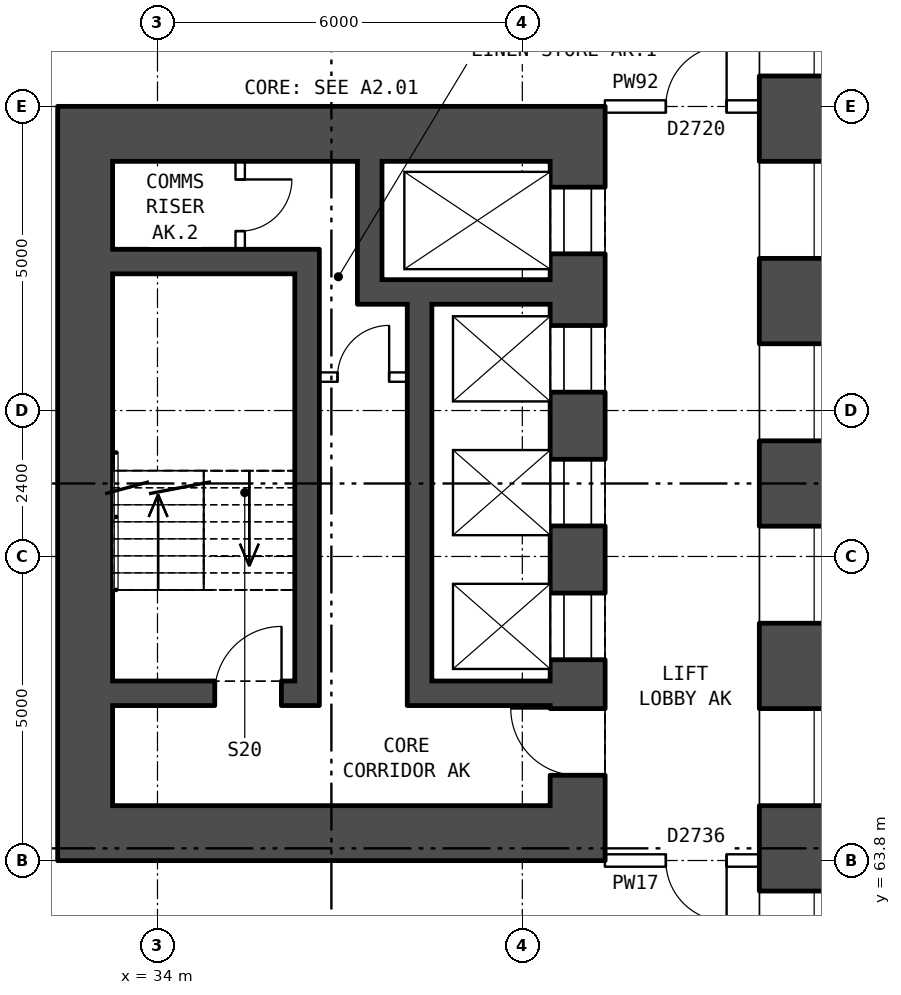
"""IFC4 building model, lengths in metres.
Left out: names, types, materials, properties, quantities, classifications, styles, units other than length and angle.
Written with IfcOpenShell. Run it as: python <this file> out.ifc"""

import sys

from ifc_helpers import new_model, si_unit, direction, frame, frame_2d, origin, place, context, subcontext, project, spatial, rectangle, extrude, element, fill, save


model = new_model("IFC4")
c1 = context("Model", 3, precision=1e-05, world=origin(), true_north=direction((0.0, 1.0)))
c2 = subcontext(c1, "Body", "Model", "MODEL_VIEW")
j1 = project(units=[si_unit("LENGTHUNIT", "METRE"), si_unit("PLANEANGLEUNIT", "RADIAN")], contexts=[c1])
p1 = place(None, origin())
s1 = spatial("IfcSite", under=j1, at=p1, CompositionType="ELEMENT")
p2 = place(p1, origin())
s2 = spatial("IfcBuilding", under=s1, at=p2, CompositionType="ELEMENT")
p3 = place(p2, origin())
s3 = spatial("IfcBuildingStorey", under=s2, at=p3, CompositionType="ELEMENT", Elevation=0.0)
p4 = place(p3, frame((44.5, 56.4, -0.35), z_axis=(0.0, 0.0, 1.0), x_axis=(0.0, 1.0, 0.0)))
e1 = element("IfcWall", 1, at=p4, inside=s3, PredefinedType="SHEAR", context=c2, shape_type="SweptSolid", body=[
    extrude(rectangle(XDim=27.2, YDim=1.2, at=frame_2d((13.6, 0.0))), origin(), (0.0, 0.0, 1.0), 5.55),
])
p5 = place(p4, frame((2.3, 0.0, 0.8)))
e2 = element("IfcOpeningElement", 2, at=p5, cuts=e1, PredefinedType="OPENING", context=c2, shape_type="SweptSolid", body=[
    extrude(rectangle(XDim=1.6, YDim=1.8, at=frame_2d((0.8, 0.9))), frame((0.0, 0.61, 0.0), z_axis=(0.0, -1.0, 0.0), x_axis=(1.0, 0.0, 0.0)), (0.0, 0.0, 1.0), 1.22),
])
p6 = place(p4, frame((5.3, 0.0, 0.8)))
e3 = element("IfcOpeningElement", 3, at=p6, cuts=e1, PredefinedType="OPENING", context=c2, shape_type="SweptSolid", body=[
    extrude(rectangle(XDim=1.6, YDim=1.8, at=frame_2d((0.8, 0.9))), frame((0.0, 0.61, 0.0), z_axis=(0.0, -1.0, 0.0), x_axis=(1.0, 0.0, 0.0)), (0.0, 0.0, 1.0), 1.22),
])
p7 = place(p4, frame((8.3, 0.0, 0.8)))
e4 = element("IfcOpeningElement", 4, at=p7, cuts=e1, PredefinedType="OPENING", context=c2, shape_type="SweptSolid", body=[
    extrude(rectangle(XDim=1.6, YDim=1.8, at=frame_2d((0.8, 0.9))), frame((0.0, 0.61, 0.0), z_axis=(0.0, -1.0, 0.0), x_axis=(1.0, 0.0, 0.0)), (0.0, 0.0, 1.0), 1.22),
])
p8 = place(p4, frame((11.3, 0.0, 0.8)))
e5 = element("IfcOpeningElement", 5, at=p8, cuts=e1, PredefinedType="OPENING", context=c2, shape_type="SweptSolid", body=[
    extrude(rectangle(XDim=1.6, YDim=1.8, at=frame_2d((0.8, 0.9))), frame((0.0, 0.61, 0.0), z_axis=(0.0, -1.0, 0.0), x_axis=(1.0, 0.0, 0.0)), (0.0, 0.0, 1.0), 1.22),
])
p9 = place(p4, frame((14.3, 0.0, 0.8)))
e6 = element("IfcOpeningElement", 6, at=p9, cuts=e1, PredefinedType="OPENING", context=c2, shape_type="SweptSolid", body=[
    extrude(rectangle(XDim=1.6, YDim=1.8, at=frame_2d((0.8, 0.9))), frame((0.0, 0.61, 0.0), z_axis=(0.0, -1.0, 0.0), x_axis=(1.0, 0.0, 0.0)), (0.0, 0.0, 1.0), 1.22),
])
p10 = place(p4, frame((17.3, 0.0, 0.8)))
e7 = element("IfcOpeningElement", 7, at=p10, cuts=e1, PredefinedType="OPENING", context=c2, shape_type="SweptSolid", body=[
    extrude(rectangle(XDim=1.6, YDim=1.8, at=frame_2d((0.8, 0.9))), frame((0.0, 0.61, 0.0), z_axis=(0.0, -1.0, 0.0), x_axis=(1.0, 0.0, 0.0)), (0.0, 0.0, 1.0), 1.22),
])
p11 = place(p4, frame((20.3, 0.0, 0.8)))
e8 = element("IfcOpeningElement", 8, at=p11, cuts=e1, PredefinedType="OPENING", context=c2, shape_type="SweptSolid", body=[
    extrude(rectangle(XDim=1.6, YDim=1.8, at=frame_2d((0.8, 0.9))), frame((0.0, 0.61, 0.0), z_axis=(0.0, -1.0, 0.0), x_axis=(1.0, 0.0, 0.0)), (0.0, 0.0, 1.0), 1.22),
])
p12 = place(p4, frame((23.3, 0.0, 0.8)))
e9 = element("IfcOpeningElement", 9, at=p12, cuts=e1, PredefinedType="OPENING", context=c2, shape_type="SweptSolid", body=[
    extrude(rectangle(XDim=1.6, YDim=1.8, at=frame_2d((0.8, 0.9))), frame((0.0, 0.61, 0.0), z_axis=(0.0, -1.0, 0.0), x_axis=(1.0, 0.0, 0.0)), (0.0, 0.0, 1.0), 1.22),
])
p13 = place(p3, frame((40.91, 75.3, 0.0), z_axis=(0.0, 0.0, 1.0), x_axis=(0.0, -1.0, 0.0)))
e10 = element("IfcWall", 10, at=p13, inside=s3, PredefinedType="SHEAR", context=c2, shape_type="SweptSolid", body=[
    extrude(rectangle(XDim=10.6, YDim=0.9, at=frame_2d((5.3, 0.0))), origin(), (0.0, 0.0, 1.0), 5.2),
])
p14 = place(p13, frame((0.425, 0.0, 0.0)))
e11 = element("IfcOpeningElement", 11, at=p14, cuts=e10, PredefinedType="OPENING", context=c2, shape_type="SweptSolid", body=[
    extrude(rectangle(XDim=1.1, YDim=2.1, at=frame_2d((0.55, 1.05))), frame((0.0, 0.46, 0.0), z_axis=(0.0, -1.0, 0.0), x_axis=(1.0, 0.0, 0.0)), (0.0, 0.0, 1.0), 0.92),
])
p15 = place(p13, frame((2.7, 0.0, 0.0)))
e12 = element("IfcOpeningElement", 12, at=p15, cuts=e10, PredefinedType="OPENING", context=c2, shape_type="SweptSolid", body=[
    extrude(rectangle(XDim=1.1, YDim=2.1, at=frame_2d((0.55, 1.05))), frame((0.0, 0.46, 0.0), z_axis=(0.0, -1.0, 0.0), x_axis=(1.0, 0.0, 0.0)), (0.0, 0.0, 1.0), 0.92),
])
p16 = place(p13, frame((4.9, 0.0, 0.0)))
e13 = element("IfcOpeningElement", 13, at=p16, cuts=e10, PredefinedType="OPENING", context=c2, shape_type="SweptSolid", body=[
    extrude(rectangle(XDim=1.1, YDim=2.1, at=frame_2d((0.55, 1.05))), frame((0.0, 0.46, 0.0), z_axis=(0.0, -1.0, 0.0), x_axis=(1.0, 0.0, 0.0)), (0.0, 0.0, 1.0), 0.92),
])
p17 = place(p13, frame((7.1, 0.0, 0.0)))
e14 = element("IfcOpeningElement", 14, at=p17, cuts=e10, PredefinedType="OPENING", context=c2, shape_type="SweptSolid", body=[
    extrude(rectangle(XDim=1.1, YDim=2.1, at=frame_2d((0.55, 1.05))), frame((0.0, 0.46, 0.0), z_axis=(0.0, -1.0, 0.0), x_axis=(1.0, 0.0, 0.0)), (0.0, 0.0, 1.0), 0.92),
])
p18 = place(p13, frame((9.0, 0.0, 0.0)))
e15 = element("IfcOpeningElement", 15, at=p18, cuts=e10, PredefinedType="OPENING", context=c2, shape_type="SweptSolid", body=[
    extrude(rectangle(XDim=1.1, YDim=2.1, at=frame_2d((0.55, 1.05))), frame((0.0, 0.46, 0.0), z_axis=(0.0, -1.0, 0.0), x_axis=(1.0, 0.0, 0.0)), (0.0, 0.0, 1.0), 0.92),
])
p19 = place(p3, frame((32.81, 75.3, 0.0), z_axis=(0.0, 0.0, 1.0), x_axis=(0.0, -1.0, 0.0)))
e16 = element("IfcWall", 16, at=p19, inside=s3, PredefinedType="SHEAR", context=c2, shape_type="SweptSolid", body=[
    extrude(rectangle(XDim=10.6, YDim=0.9, at=frame_2d((5.3, 0.0))), origin(), (0.0, 0.0, 1.0), 5.2),
])
for number, where, z_axis, x_axis in (
    (17, (41.36, 75.75, 0.0), (0.0, 0.0, 1.0), (-1.0, 0.0, 0.0)),
    (18, (41.36, 64.25, 0.0), (0.0, 0.0, 1.0), (-1.0, 0.0, 0.0)),
):
    element("IfcWall", number, at=place(p3, frame(where, z_axis=z_axis, x_axis=x_axis)), inside=s3, PredefinedType="SHEAR", context=c2, shape_type="SweptSolid", body=[
        extrude(rectangle(XDim=9.0, YDim=0.9, at=frame_2d((4.5, 0.0))), origin(), (0.0, 0.0, 1.0), 5.2),
    ])
p20 = place(p3, frame((36.26, 73.65, 0.0), z_axis=(0.0, 0.0, 1.0), x_axis=(-1.0, 0.0, 0.0)))
e19 = element("IfcWall", 19, at=p20, inside=s3, PredefinedType="SHEAR", context=c2, shape_type="SweptSolid", body=[
    extrude(rectangle(XDim=3.0, YDim=0.4, at=frame_2d((1.5, 0.0))), origin(), (0.0, 0.0, 1.0), 5.2),
])
p21 = place(p3, frame((40.46, 73.15, 0.0), z_axis=(0.0, 0.0, 1.0), x_axis=(-1.0, 0.0, 0.0)))
e20 = element("IfcWall", 20, at=p21, inside=s3, PredefinedType="SHEAR", context=c2, shape_type="SweptSolid", body=[
    extrude(rectangle(XDim=3.17, YDim=0.4, at=frame_2d((1.585, 0.0))), origin(), (0.0, 0.0, 1.0), 5.2),
])
p22 = place(p3, frame((38.11, 71.75, 0.0), z_axis=(0.0, 0.0, 1.0), x_axis=(-1.0, 0.0, 0.0)))
e21 = element("IfcWall", 21, at=p22, inside=s3, PredefinedType="PARTITIONING", context=c2, shape_type="SweptSolid", body=[
    extrude(rectangle(XDim=1.45, YDim=0.15, at=frame_2d((0.725, 0.0))), origin(), (0.0, 0.0, 1.0), 5.2),
])
p23 = place(p22, frame((0.3, 0.0, 0.0)))
e22 = element("IfcOpeningElement", 22, at=p23, cuts=e21, PredefinedType="OPENING", context=c2, shape_type="SweptSolid", body=[
    extrude(rectangle(XDim=0.85, YDim=2.1, at=frame_2d((0.425, 1.05))), frame((0.0, 0.085, 0.0), z_axis=(0.0, -1.0, 0.0), x_axis=(1.0, 0.0, 0.0)), (0.0, 0.0, 1.0), 0.17),
])
p24 = place(p3, frame((40.46, 66.55, 0.0), z_axis=(0.0, 0.0, 1.0), x_axis=(-1.0, 0.0, 0.0)))
e23 = element("IfcWall", 23, at=p24, inside=s3, PredefinedType="SHEAR", context=c2, shape_type="SweptSolid", body=[
    extrude(rectangle(XDim=1.95, YDim=0.4, at=frame_2d((0.975, 0.0))), origin(), (0.0, 0.0, 1.0), 5.2),
])
p25 = place(p3, frame((36.26, 66.55, 0.0), z_axis=(0.0, 0.0, 1.0), x_axis=(-1.0, 0.0, 0.0)))
e24 = element("IfcWall", 24, at=p25, inside=s3, PredefinedType="SHEAR", context=c2, shape_type="SweptSolid", body=[
    extrude(rectangle(XDim=3.0, YDim=0.4, at=frame_2d((1.5, 0.0))), origin(), (0.0, 0.0, 1.0), 5.2),
])
p26 = place(p25, frame((0.22, 0.0, 0.0)))
e25 = element("IfcOpeningElement", 25, at=p26, cuts=e24, PredefinedType="OPENING", context=c2, shape_type="SweptSolid", body=[
    extrude(rectangle(XDim=1.1, YDim=2.1, at=frame_2d((0.55, 1.05))), frame((0.0, 0.21, 0.0), z_axis=(0.0, -1.0, 0.0), x_axis=(1.0, 0.0, 0.0)), (0.0, 0.0, 1.0), 0.42),
])
p27 = place(p3, frame((38.31, 72.95, 0.0), z_axis=(0.0, 0.0, 1.0), x_axis=(0.0, -1.0, 0.0)))
e26 = element("IfcWall", 26, at=p27, inside=s3, PredefinedType="SHEAR", context=c2, shape_type="SweptSolid", body=[
    extrude(rectangle(XDim=6.6, YDim=0.4, at=frame_2d((3.3, 0.0))), origin(), (0.0, 0.0, 1.0), 5.2),
])
p28 = place(p3, frame((37.49, 75.3, 0.0), z_axis=(0.0, 0.0, 1.0), x_axis=(0.0, -1.0, 0.0)))
e27 = element("IfcWall", 27, at=p28, inside=s3, PredefinedType="SHEAR", context=c2, shape_type="SweptSolid", body=[
    extrude(rectangle(XDim=1.95, YDim=0.4, at=frame_2d((0.975, 0.0))), origin(), (0.0, 0.0, 1.0), 5.2),
])
p29 = place(p3, frame((36.46, 73.85, 0.0), z_axis=(0.0, 0.0, 1.0), x_axis=(0.0, -1.0, 0.0)))
e28 = element("IfcWall", 28, at=p29, inside=s3, PredefinedType="SHEAR", context=c2, shape_type="SweptSolid", body=[
    extrude(rectangle(XDim=7.5, YDim=0.4, at=frame_2d((3.75, 0.0))), origin(), (0.0, 0.0, 1.0), 5.2),
])
p30 = place(p3, frame((35.36, 75.3, 0.0), z_axis=(0.0, 0.0, 1.0), x_axis=(0.0, -1.0, 0.0)))
e29 = element("IfcWall", 29, at=p30, inside=s3, PredefinedType="PARTITIONING", context=c2, shape_type="SweptSolid", body=[
    extrude(rectangle(XDim=1.45, YDim=0.15, at=frame_2d((0.725, 0.0))), origin(), (0.0, 0.0, 1.0), 5.2),
])
p31 = place(p30, frame((0.3, 0.0, 0.0)))
e30 = element("IfcOpeningElement", 30, at=p31, cuts=e29, PredefinedType="OPENING", context=c2, shape_type="SweptSolid", body=[
    extrude(rectangle(XDim=0.85, YDim=2.1, at=frame_2d((0.425, 1.05))), frame((0.0, 0.085, 0.0), z_axis=(0.0, -1.0, 0.0), x_axis=(1.0, 0.0, 0.0)), (0.0, 0.0, 1.0), 0.17),
])
p32 = place(p3, frame((41.36, 63.8, 0.0), z_axis=(0.0, 0.0, 1.0), x_axis=(1.0, 0.0, 0.0)))
e31 = element("IfcWall", 31, at=p32, inside=s3, PredefinedType="PARTITIONING", context=c2, shape_type="SweptSolid", body=[
    extrude(rectangle(XDim=2.54, YDim=0.2, at=frame_2d((1.27, 0.0))), origin(), (0.0, 0.0, 1.0), 5.2),
])
p33 = place(p32, frame((1.0, 0.0, 0.0)))
e32 = element("IfcOpeningElement", 32, at=p33, cuts=e31, PredefinedType="OPENING", context=c2, shape_type="SweptSolid", body=[
    extrude(rectangle(XDim=1.0, YDim=2.1, at=frame_2d((0.5, 1.05))), frame((0.0, 0.11, 0.0), z_axis=(0.0, -1.0, 0.0), x_axis=(1.0, 0.0, 0.0)), (0.0, 0.0, 1.0), 0.22),
])
p34 = place(p3, frame((41.36, 76.2, 0.0), z_axis=(0.0, 0.0, 1.0), x_axis=(1.0, 0.0, 0.0)))
e33 = element("IfcWall", 33, at=p34, inside=s3, PredefinedType="PARTITIONING", context=c2, shape_type="SweptSolid", body=[
    extrude(rectangle(XDim=2.54, YDim=0.2, at=frame_2d((1.27, 0.0))), origin(), (0.0, 0.0, 1.0), 5.2),
])
p35 = place(p34, frame((1.0, 0.0, 0.0)))
e34 = element("IfcOpeningElement", 34, at=p35, cuts=e33, PredefinedType="OPENING", context=c2, shape_type="SweptSolid", body=[
    extrude(rectangle(XDim=1.0, YDim=2.1, at=frame_2d((0.5, 1.05))), frame((0.0, 0.11, 0.0), z_axis=(0.0, -1.0, 0.0), x_axis=(1.0, 0.0, 0.0)), (0.0, 0.0, 1.0), 0.22),
])
p36 = place(p6, origin())
e35 = element("IfcWindow", 35, at=p36, inside=s3, PartitioningType="SINGLE_PANEL", PredefinedType="WINDOW", context=c2, shape_type="SweptSolid", body=[
    extrude(rectangle(XDim=1.6, YDim=1.8, at=frame_2d((0.8, 0.9))), frame((0.0, -0.27, 0.0), z_axis=(0.0, -1.0, 0.0), x_axis=(1.0, 0.0, 0.0)), (0.0, 0.0, 1.0), 0.06),
])
fill(e3, e35)
p37 = place(p7, origin())
e36 = element("IfcWindow", 36, at=p37, inside=s3, PartitioningType="SINGLE_PANEL", PredefinedType="WINDOW", context=c2, shape_type="SweptSolid", body=[
    extrude(rectangle(XDim=1.6, YDim=1.8, at=frame_2d((0.8, 0.9))), frame((0.0, -0.27, 0.0), z_axis=(0.0, -1.0, 0.0), x_axis=(1.0, 0.0, 0.0)), (0.0, 0.0, 1.0), 0.06),
])
fill(e4, e36)
p38 = place(p8, origin())
e37 = element("IfcWindow", 37, at=p38, inside=s3, PartitioningType="SINGLE_PANEL", PredefinedType="WINDOW", context=c2, shape_type="SweptSolid", body=[
    extrude(rectangle(XDim=1.6, YDim=1.8, at=frame_2d((0.8, 0.9))), frame((0.0, -0.27, 0.0), z_axis=(0.0, -1.0, 0.0), x_axis=(1.0, 0.0, 0.0)), (0.0, 0.0, 1.0), 0.06),
])
fill(e5, e37)
p39 = place(p9, origin())
e38 = element("IfcWindow", 38, at=p39, inside=s3, PartitioningType="SINGLE_PANEL", PredefinedType="WINDOW", context=c2, shape_type="SweptSolid", body=[
    extrude(rectangle(XDim=1.6, YDim=1.8, at=frame_2d((0.8, 0.9))), frame((0.0, -0.27, 0.0), z_axis=(0.0, -1.0, 0.0), x_axis=(1.0, 0.0, 0.0)), (0.0, 0.0, 1.0), 0.06),
])
fill(e6, e38)
p40 = place(p10, origin())
e39 = element("IfcWindow", 39, at=p40, inside=s3, PartitioningType="SINGLE_PANEL", PredefinedType="WINDOW", context=c2, shape_type="SweptSolid", body=[
    extrude(rectangle(XDim=1.6, YDim=1.8, at=frame_2d((0.8, 0.9))), frame((0.0, -0.27, 0.0), z_axis=(0.0, -1.0, 0.0), x_axis=(1.0, 0.0, 0.0)), (0.0, 0.0, 1.0), 0.06),
])
fill(e7, e39)
p41 = place(p11, origin())
e40 = element("IfcWindow", 40, at=p41, inside=s3, PartitioningType="SINGLE_PANEL", PredefinedType="WINDOW", context=c2, shape_type="SweptSolid", body=[
    extrude(rectangle(XDim=1.6, YDim=1.8, at=frame_2d((0.8, 0.9))), frame((0.0, -0.27, 0.0), z_axis=(0.0, -1.0, 0.0), x_axis=(1.0, 0.0, 0.0)), (0.0, 0.0, 1.0), 0.06),
])
fill(e8, e40)
p42 = place(p14, origin())
e41 = element("IfcDoor", 41, at=p42, inside=s3, OperationType="DOUBLE_DOOR_SLIDING", PredefinedType="DOOR", context=c2, shape_type="SweptSolid", body=[
    extrude(rectangle(XDim=1.1, YDim=2.1, at=frame_2d((0.55, 1.05))), frame((0.0, -0.385, 0.0), z_axis=(0.0, -1.0, 0.0), x_axis=(1.0, 0.0, 0.0)), (0.0, 0.0, 1.0), 0.05),
])
fill(e11, e41)
p43 = place(p15, origin())
e42 = element("IfcDoor", 42, at=p43, inside=s3, OperationType="DOUBLE_DOOR_SLIDING", PredefinedType="DOOR", context=c2, shape_type="SweptSolid", body=[
    extrude(rectangle(XDim=1.1, YDim=2.1, at=frame_2d((0.55, 1.05))), frame((0.0, -0.385, 0.0), z_axis=(0.0, -1.0, 0.0), x_axis=(1.0, 0.0, 0.0)), (0.0, 0.0, 1.0), 0.05),
])
fill(e12, e42)
p44 = place(p16, origin())
e43 = element("IfcDoor", 43, at=p44, inside=s3, OperationType="DOUBLE_DOOR_SLIDING", PredefinedType="DOOR", context=c2, shape_type="SweptSolid", body=[
    extrude(rectangle(XDim=1.1, YDim=2.1, at=frame_2d((0.55, 1.05))), frame((0.0, -0.385, 0.0), z_axis=(0.0, -1.0, 0.0), x_axis=(1.0, 0.0, 0.0)), (0.0, 0.0, 1.0), 0.05),
])
fill(e13, e43)
p45 = place(p17, origin())
e44 = element("IfcDoor", 44, at=p45, inside=s3, OperationType="DOUBLE_DOOR_SLIDING", PredefinedType="DOOR", context=c2, shape_type="SweptSolid", body=[
    extrude(rectangle(XDim=1.1, YDim=2.1, at=frame_2d((0.55, 1.05))), frame((0.0, -0.385, 0.0), z_axis=(0.0, -1.0, 0.0), x_axis=(1.0, 0.0, 0.0)), (0.0, 0.0, 1.0), 0.05),
])
fill(e14, e44)
p46 = place(p18, frame((1.1, 0.0, 0.0), z_axis=(0.0, 0.0, 1.0), x_axis=(-1.0, 0.0, 0.0)))
e45 = element("IfcDoor", 45, at=p46, inside=s3, OperationType="SINGLE_SWING_RIGHT", PredefinedType="DOOR", context=c2, shape_type="SweptSolid", body=[
    extrude(rectangle(XDim=1.1, YDim=2.1, at=frame_2d((0.55, 1.05))), frame((0.0, 0.025, 0.0), z_axis=(0.0, -1.0, 0.0), x_axis=(1.0, 0.0, 0.0)), (0.0, 0.0, 1.0), 0.05),
])
fill(e15, e45)
p47 = place(p26, frame((1.1, 0.0, 0.0), z_axis=(0.0, 0.0, 1.0), x_axis=(-1.0, 0.0, 0.0)))
e46 = element("IfcDoor", 46, at=p47, inside=s3, OperationType="SINGLE_SWING_RIGHT", PredefinedType="DOOR", context=c2, shape_type="SweptSolid", body=[
    extrude(rectangle(XDim=1.1, YDim=2.1, at=frame_2d((0.55, 1.05))), frame((0.0, 0.025, 0.0), z_axis=(0.0, -1.0, 0.0), x_axis=(1.0, 0.0, 0.0)), (0.0, 0.0, 1.0), 0.05),
])
fill(e25, e46)
p48 = place(p23, frame((0.85, 0.0, 0.0), z_axis=(0.0, 0.0, 1.0), x_axis=(-1.0, 0.0, 0.0)))
e47 = element("IfcDoor", 47, at=p48, inside=s3, OperationType="SINGLE_SWING_RIGHT", PredefinedType="DOOR", context=c2, shape_type="SweptSolid", body=[
    extrude(rectangle(XDim=0.85, YDim=2.1, at=frame_2d((0.425, 1.05))), frame((0.0, 0.025, 0.0), z_axis=(0.0, -1.0, 0.0), x_axis=(1.0, 0.0, 0.0)), (0.0, 0.0, 1.0), 0.05),
])
fill(e22, e47)
p49 = place(p31, origin())
e48 = element("IfcDoor", 48, at=p49, inside=s3, OperationType="SINGLE_SWING_LEFT", PredefinedType="DOOR", context=c2, shape_type="SweptSolid", body=[
    extrude(rectangle(XDim=0.85, YDim=2.1, at=frame_2d((0.425, 1.05))), frame((0.0, 0.025, 0.0), z_axis=(0.0, -1.0, 0.0), x_axis=(1.0, 0.0, 0.0)), (0.0, 0.0, 1.0), 0.05),
])
fill(e30, e48)
p50 = place(p33, frame((1.0, 0.0, 0.0), z_axis=(0.0, 0.0, 1.0), x_axis=(-1.0, 0.0, 0.0)))
e49 = element("IfcDoor", 49, at=p50, inside=s3, OperationType="SINGLE_SWING_LEFT", PredefinedType="DOOR", context=c2, shape_type="SweptSolid", body=[
    extrude(rectangle(XDim=1.0, YDim=2.1, at=frame_2d((0.5, 1.05))), frame((0.0, 0.025, 0.0), z_axis=(0.0, -1.0, 0.0), x_axis=(1.0, 0.0, 0.0)), (0.0, 0.0, 1.0), 0.05),
])
fill(e32, e49)
p51 = place(p35, origin())
e50 = element("IfcDoor", 50, at=p51, inside=s3, OperationType="SINGLE_SWING_RIGHT", PredefinedType="DOOR", context=c2, shape_type="SweptSolid", body=[
    extrude(rectangle(XDim=1.0, YDim=2.1, at=frame_2d((0.5, 1.05))), frame((0.0, 0.025, 0.0), z_axis=(0.0, -1.0, 0.0), x_axis=(1.0, 0.0, 0.0)), (0.0, 0.0, 1.0), 0.05),
])
fill(e34, e50)
save(model, sys.argv[1])
